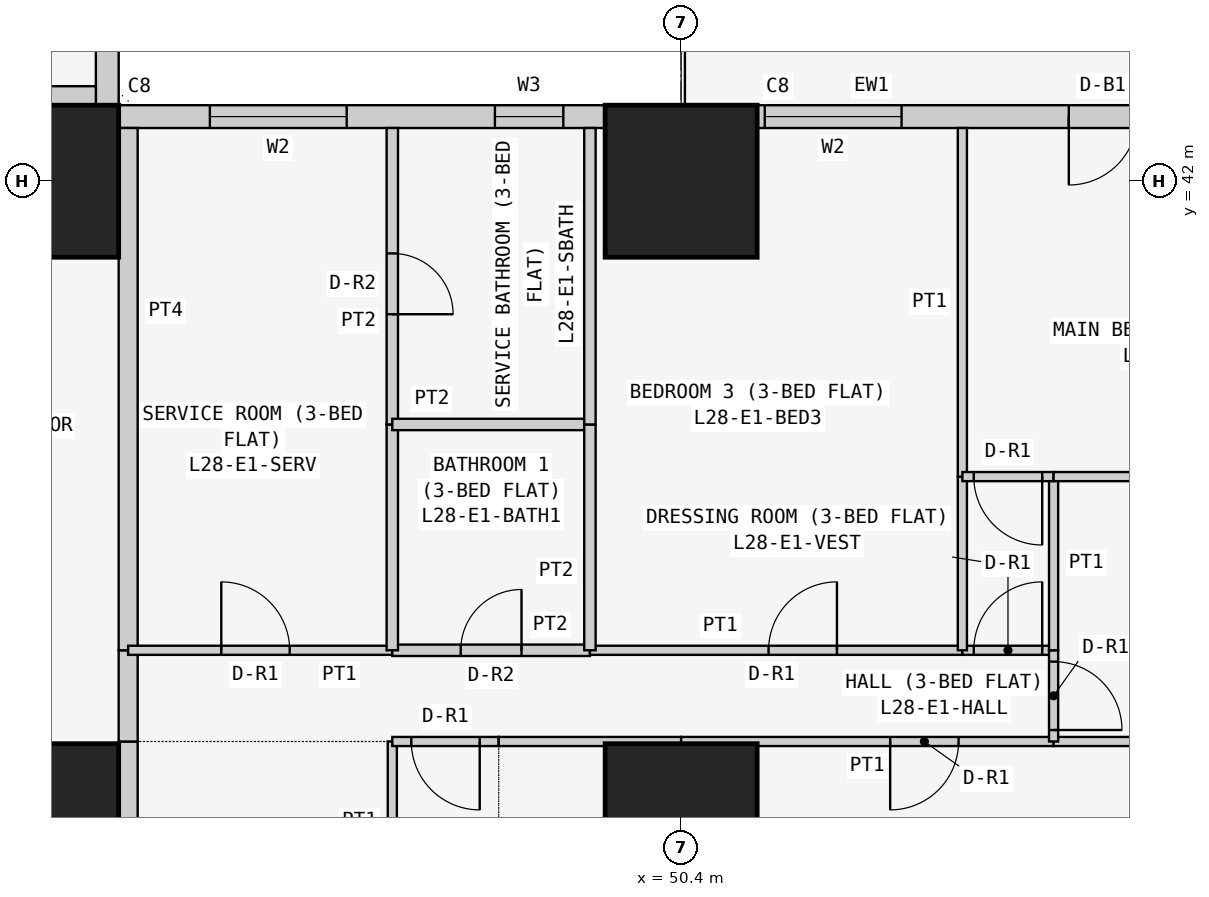
"""IFC4 building model, lengths in metres.
Left out: names, types, materials, properties, quantities, classifications, styles, units other than length and angle.
Written with IfcOpenShell. Run it as: python <this file> out.ifc"""

import sys

from ifc_helpers import new_model, si_unit, direction, frame, frame_2d, origin, origin_2d, place, context, subcontext, project, spatial, rectangle, extrude, element, fill, save


model = new_model("IFC4")
c1 = context("Model", 3, precision=1e-05, world=origin(), true_north=direction((0.0, 1.0)))
c2 = subcontext(c1, "Body", "Model", "MODEL_VIEW")
j1 = project(units=[si_unit("LENGTHUNIT", "METRE"), si_unit("PLANEANGLEUNIT", "RADIAN")], contexts=[c1])
p1 = place(None, origin())
s1 = spatial("IfcSite", under=j1, at=p1, CompositionType="ELEMENT")
p2 = place(p1, origin())
s2 = spatial("IfcBuilding", under=s1, at=p2, CompositionType="ELEMENT")
p3 = place(p2, frame((0.0, 0.0, 112.5)))
s3 = spatial("IfcBuildingStorey", under=s2, at=p3, CompositionType="ELEMENT", Elevation=112.5)
for number, where, z_axis, x_axis in (
    (1, (42.0, 33.6, 0.0), (0.0, 0.0, 1.0), (1.0, 0.0, 0.0)),
    (2, (42.0, 42.0, 0.0), (0.0, 0.0, 1.0), (1.0, 0.0, 0.0)),
    (3, (50.4, 33.6, 0.0), (0.0, 0.0, 1.0), (1.0, 0.0, 0.0)),
    (4, (50.4, 42.0, 0.0), (0.0, 0.0, 1.0), (1.0, 0.0, 0.0)),
):
    element("IfcColumn", number, at=place(p3, frame(where, z_axis=z_axis, x_axis=x_axis)), inside=s3, PredefinedType="COLUMN", context=c2, shape_type="SweptSolid", body=[
        extrude(rectangle(XDim=2.0, YDim=2.0, at=origin_2d()), origin(), (0.0, 0.0, 1.0), 3.6),
    ])
p4 = place(p3, frame((58.4, 42.85, 0.0), z_axis=(0.0, 0.0, 1.0), x_axis=(-1.0, 0.0, 0.0)))
e5 = element("IfcWall", 5, at=p4, inside=s3, PredefinedType="SOLIDWALL", context=c2, shape_type="SweptSolid", body=[
    extrude(rectangle(XDim=15.7, YDim=0.3, at=frame_2d((7.85, 0.0))), origin(), (0.0, 0.0, 1.0), 3.45),
])
p5 = place(p4, frame((12.4, 0.0, 0.9)))
e6 = element("IfcOpeningElement", 6, at=p5, cuts=e5, PredefinedType="OPENING", context=c2, shape_type="SweptSolid", body=[
    extrude(rectangle(XDim=1.8, YDim=1.5, at=frame_2d((0.9, 0.75))), frame((0.0, 0.16, 0.0), z_axis=(0.0, -1.0, 0.0), x_axis=(1.0, 0.0, 0.0)), (0.0, 0.0, 1.0), 0.32),
])
p6 = place(p4, frame((9.55, 0.0, 1.5)))
e7 = element("IfcOpeningElement", 7, at=p6, cuts=e5, PredefinedType="OPENING", context=c2, shape_type="SweptSolid", body=[
    extrude(rectangle(XDim=0.9, YDim=0.7, at=frame_2d((0.45, 0.35))), frame((0.0, 0.16, 0.0), z_axis=(0.0, -1.0, 0.0), x_axis=(1.0, 0.0, 0.0)), (0.0, 0.0, 1.0), 0.32),
])
p7 = place(p4, frame((5.1, 0.0, 0.9)))
e8 = element("IfcOpeningElement", 8, at=p7, cuts=e5, PredefinedType="OPENING", context=c2, shape_type="SweptSolid", body=[
    extrude(rectangle(XDim=1.8, YDim=1.5, at=frame_2d((0.9, 0.75))), frame((0.0, 0.16, 0.0), z_axis=(0.0, -1.0, 0.0), x_axis=(1.0, 0.0, 0.0)), (0.0, 0.0, 1.0), 0.32),
])
p8 = place(p4, frame((2.0, 0.0, 0.0)))
e9 = element("IfcOpeningElement", 9, at=p8, cuts=e5, PredefinedType="OPENING", context=c2, shape_type="SweptSolid", body=[
    extrude(rectangle(XDim=0.9, YDim=2.4, at=frame_2d((0.45, 1.2))), frame((0.0, 0.16, 0.0), z_axis=(0.0, -1.0, 0.0), x_axis=(1.0, 0.0, 0.0)), (0.0, 0.0, 1.0), 0.32),
])
p9 = place(p4, frame((0.7, 0.0, 0.9)))
e10 = element("IfcOpeningElement", 10, at=p9, cuts=e5, PredefinedType="OPENING", context=c2, shape_type="SweptSolid", body=[
    extrude(rectangle(XDim=1.2, YDim=1.5, at=frame_2d((0.6, 0.75))), frame((0.0, 0.16, 0.0), z_axis=(0.0, -1.0, 0.0), x_axis=(1.0, 0.0, 0.0)), (0.0, 0.0, 1.0), 0.32),
])
p10 = place(p3, frame((42.85, 43.0, 0.0), z_axis=(0.0, 0.0, 1.0), x_axis=(0.0, 1.0, 0.0)))
e11 = element("IfcWall", 11, at=p10, inside=s3, PredefinedType="SOLIDWALL", context=c2, shape_type="SweptSolid", body=[
    extrude(rectangle(XDim=7.0, YDim=0.3, at=frame_2d((3.5, 0.0))), origin(), (0.0, 0.0, 1.0), 3.45),
])
p11 = place(p10, frame((1.5, 0.0, 0.9)))
e12 = element("IfcOpeningElement", 12, at=p11, cuts=e11, PredefinedType="OPENING", context=c2, shape_type="SweptSolid", body=[
    extrude(rectangle(XDim=2.4, YDim=1.5, at=frame_2d((1.2, 0.75))), frame((0.0, 0.16, 0.0), z_axis=(0.0, -1.0, 0.0), x_axis=(1.0, 0.0, 0.0)), (0.0, 0.0, 1.0), 0.32),
])
p12 = place(p10, frame((5.05, 0.0, 0.9)))
e13 = element("IfcOpeningElement", 13, at=p12, cuts=e11, PredefinedType="OPENING", context=c2, shape_type="SweptSolid", body=[
    extrude(rectangle(XDim=1.2, YDim=1.5, at=frame_2d((0.6, 0.75))), frame((0.0, 0.16, 0.0), z_axis=(0.0, -1.0, 0.0), x_axis=(1.0, 0.0, 0.0)), (0.0, 0.0, 1.0), 0.32),
])
p13 = place(p3, frame((35.829, 43.125, 0.0), z_axis=(0.0, 0.0, 1.0), x_axis=(1.0, 0.0, 0.0)))
e14 = element("IfcWall", 14, at=p13, inside=s3, PredefinedType="PARTITIONING", context=c2, shape_type="SweptSolid", body=[
    extrude(rectangle(XDim=6.871, YDim=0.25, at=frame_2d((3.436, 0.0))), origin(), (0.0, 0.0, 1.0), 3.45),
])
p14 = place(p3, frame((43.125, 34.629, 0.0), z_axis=(0.0, 0.0, 1.0), x_axis=(0.0, -1.0, 0.0)))
e15 = element("IfcWall", 15, at=p14, inside=s3, PredefinedType="PARTITIONING", context=c2, shape_type="SweptSolid", body=[
    extrude(rectangle(XDim=5.229, YDim=0.25, at=frame_2d((2.615, 0.0))), origin(), (0.0, 0.0, 1.0), 3.45),
])
p15 = place(p14, frame((2.229, 0.0, 0.0)))
e16 = element("IfcOpeningElement", 16, at=p15, cuts=e15, PredefinedType="OPENING", context=c2, shape_type="SweptSolid", body=[
    extrude(rectangle(XDim=1.0, YDim=2.1, at=frame_2d((0.5, 1.05))), frame((0.0, 0.135, 0.0), z_axis=(0.0, -1.0, 0.0), x_axis=(1.0, 0.0, 0.0)), (0.0, 0.0, 1.0), 0.27),
])
p16 = place(p3, frame((43.125, 35.829, 0.0), z_axis=(0.0, 0.0, 1.0), x_axis=(0.0, -1.0, 0.0)))
e17 = element("IfcWall", 17, at=p16, inside=s3, PredefinedType="PARTITIONING", context=c2, shape_type="SweptSolid", body=[
    extrude(rectangle(XDim=1.2, YDim=0.25, at=frame_2d((0.6, 0.0))), origin(), (0.0, 0.0, 1.0), 3.45),
])
p17 = place(p3, frame((43.125, 42.7, 0.0), z_axis=(0.0, 0.0, 1.0), x_axis=(0.0, -1.0, 0.0)))
e18 = element("IfcWall", 18, at=p17, inside=s3, PredefinedType="PARTITIONING", context=c2, shape_type="SweptSolid", body=[
    extrude(rectangle(XDim=6.871, YDim=0.25, at=frame_2d((3.436, 0.0))), origin(), (0.0, 0.0, 1.0), 3.45),
])
p18 = place(p3, frame((46.6, 29.4, 0.0), z_axis=(0.0, 0.0, 1.0), x_axis=(0.0, 1.0, 0.0)))
e19 = element("IfcWall", 19, at=p18, inside=s3, PredefinedType="PARTITIONING", context=c2, shape_type="SweptSolid", body=[
    extrude(rectangle(XDim=5.229, YDim=0.12, at=frame_2d((2.615, 0.0))), origin(), (0.0, 0.0, 1.0), 3.45),
])
p19 = place(p3, frame((48.0, 34.629, 0.0), z_axis=(0.0, 0.0, 1.0), x_axis=(-1.0, 0.0, 0.0)))
e20 = element("IfcWall", 20, at=p19, inside=s3, PredefinedType="PARTITIONING", context=c2, shape_type="SweptSolid", body=[
    extrude(rectangle(XDim=1.4, YDim=0.12, at=frame_2d((0.7, 0.0))), origin(), (0.0, 0.0, 1.0), 3.45),
])
p20 = place(p19, frame((0.25, 0.0, 0.0)))
e21 = element("IfcOpeningElement", 21, at=p20, cuts=e20, PredefinedType="OPENING", context=c2, shape_type="SweptSolid", body=[
    extrude(rectangle(XDim=0.9, YDim=2.1, at=frame_2d((0.45, 1.05))), frame((0.0, 0.07, 0.0), z_axis=(0.0, -1.0, 0.0), x_axis=(1.0, 0.0, 0.0)), (0.0, 0.0, 1.0), 0.14),
])
p21 = place(p3, frame((50.4, 34.629, 0.0), z_axis=(0.0, 0.0, 1.0), x_axis=(-1.0, 0.0, 0.0)))
e22 = element("IfcWall", 22, at=p21, inside=s3, PredefinedType="PARTITIONING", context=c2, shape_type="SweptSolid", body=[
    extrude(rectangle(XDim=2.4, YDim=0.12, at=frame_2d((1.2, 0.0))), origin(), (0.0, 0.0, 1.0), 3.45),
])
p22 = place(p3, frame((55.3, 34.629, 0.0), z_axis=(0.0, 0.0, 1.0), x_axis=(-1.0, 0.0, 0.0)))
e23 = element("IfcWall", 23, at=p22, inside=s3, PredefinedType="PARTITIONING", context=c2, shape_type="SweptSolid", body=[
    extrude(rectangle(XDim=4.9, YDim=0.12, at=frame_2d((2.45, 0.0))), origin(), (0.0, 0.0, 1.0), 3.45),
])
p23 = place(p22, frame((1.25, 0.0, 0.0)))
e24 = element("IfcOpeningElement", 24, at=p23, cuts=e23, PredefinedType="OPENING", context=c2, shape_type="SweptSolid", body=[
    extrude(rectangle(XDim=0.9, YDim=2.1, at=frame_2d((0.45, 1.05))), frame((0.0, 0.07, 0.0), z_axis=(0.0, -1.0, 0.0), x_axis=(1.0, 0.0, 0.0)), (0.0, 0.0, 1.0), 0.14),
])
p24 = place(p3, frame((59.45, 34.629, 0.0), z_axis=(0.0, 0.0, 1.0), x_axis=(-1.0, 0.0, 0.0)))
e25 = element("IfcWall", 25, at=p24, inside=s3, PredefinedType="PARTITIONING", context=c2, shape_type="SweptSolid", body=[
    extrude(rectangle(XDim=4.15, YDim=0.12, at=frame_2d((2.075, 0.0))), origin(), (0.0, 0.0, 1.0), 3.45),
])
p25 = place(p3, frame((46.6, 35.829, 0.0), z_axis=(0.0, 0.0, 1.0), x_axis=(-1.0, 0.0, 0.0)))
e26 = element("IfcWall", 26, at=p25, inside=s3, PredefinedType="PARTITIONING", context=c2, shape_type="SweptSolid", body=[
    extrude(rectangle(XDim=3.475, YDim=0.12, at=frame_2d((1.738, 0.0))), origin(), (0.0, 0.0, 1.0), 3.45),
])
p26 = place(p25, frame((1.35, 0.0, 0.0)))
e27 = element("IfcOpeningElement", 27, at=p26, cuts=e26, PredefinedType="OPENING", context=c2, shape_type="SweptSolid", body=[
    extrude(rectangle(XDim=0.9, YDim=2.1, at=frame_2d((0.45, 1.05))), frame((0.0, 0.07, 0.0), z_axis=(0.0, -1.0, 0.0), x_axis=(1.0, 0.0, 0.0)), (0.0, 0.0, 1.0), 0.14),
])
p27 = place(p3, frame((49.2, 35.829, 0.0), z_axis=(0.0, 0.0, 1.0), x_axis=(-1.0, 0.0, 0.0)))
e28 = element("IfcWall", 28, at=p27, inside=s3, PredefinedType="PARTITIONING", context=c2, shape_type="SweptSolid", body=[
    extrude(rectangle(XDim=2.6, YDim=0.15, at=frame_2d((1.3, 0.0))), origin(), (0.0, 0.0, 1.0), 3.45),
])
p28 = place(p27, frame((0.9, 0.0, 0.0)))
e29 = element("IfcOpeningElement", 29, at=p28, cuts=e28, PredefinedType="OPENING", context=c2, shape_type="SweptSolid", body=[
    extrude(rectangle(XDim=0.8, YDim=2.1, at=frame_2d((0.4, 1.05))), frame((0.0, 0.085, 0.0), z_axis=(0.0, -1.0, 0.0), x_axis=(1.0, 0.0, 0.0)), (0.0, 0.0, 1.0), 0.17),
])
p29 = place(p3, frame((54.1, 35.829, 0.0), z_axis=(0.0, 0.0, 1.0), x_axis=(-1.0, 0.0, 0.0)))
e30 = element("IfcWall", 30, at=p29, inside=s3, PredefinedType="PARTITIONING", context=c2, shape_type="SweptSolid", body=[
    extrude(rectangle(XDim=4.9, YDim=0.12, at=frame_2d((2.45, 0.0))), origin(), (0.0, 0.0, 1.0), 3.45),
])
p30 = place(p29, frame((1.65, 0.0, 0.0)))
e31 = element("IfcOpeningElement", 31, at=p30, cuts=e30, PredefinedType="OPENING", context=c2, shape_type="SweptSolid", body=[
    extrude(rectangle(XDim=0.9, YDim=2.1, at=frame_2d((0.45, 1.05))), frame((0.0, 0.07, 0.0), z_axis=(0.0, -1.0, 0.0), x_axis=(1.0, 0.0, 0.0)), (0.0, 0.0, 1.0), 0.14),
])
p31 = place(p3, frame((55.3, 35.829, 0.0), z_axis=(0.0, 0.0, 1.0), x_axis=(-1.0, 0.0, 0.0)))
e32 = element("IfcWall", 32, at=p31, inside=s3, PredefinedType="PARTITIONING", context=c2, shape_type="SweptSolid", body=[
    extrude(rectangle(XDim=1.2, YDim=0.12, at=frame_2d((0.6, 0.0))), origin(), (0.0, 0.0, 1.0), 3.45),
])
p32 = place(p31, frame((0.15, 0.0, 0.0)))
e33 = element("IfcOpeningElement", 33, at=p32, cuts=e32, PredefinedType="OPENING", context=c2, shape_type="SweptSolid", body=[
    extrude(rectangle(XDim=0.9, YDim=2.1, at=frame_2d((0.45, 1.05))), frame((0.0, 0.07, 0.0), z_axis=(0.0, -1.0, 0.0), x_axis=(1.0, 0.0, 0.0)), (0.0, 0.0, 1.0), 0.14),
])
p33 = place(p3, frame((55.3, 34.629, 0.0), z_axis=(0.0, 0.0, 1.0), x_axis=(0.0, 1.0, 0.0)))
e34 = element("IfcWall", 34, at=p33, inside=s3, PredefinedType="PARTITIONING", context=c2, shape_type="SweptSolid", body=[
    extrude(rectangle(XDim=1.2, YDim=0.12, at=frame_2d((0.6, 0.0))), origin(), (0.0, 0.0, 1.0), 3.45),
])
p34 = place(p33, frame((0.151, 0.0, 0.0)))
e35 = element("IfcOpeningElement", 35, at=p34, cuts=e34, PredefinedType="OPENING", context=c2, shape_type="SweptSolid", body=[
    extrude(rectangle(XDim=0.9, YDim=2.1, at=frame_2d((0.45, 1.05))), frame((0.0, 0.07, 0.0), z_axis=(0.0, -1.0, 0.0), x_axis=(1.0, 0.0, 0.0)), (0.0, 0.0, 1.0), 0.14),
])
p35 = place(p3, frame((46.6, 35.829, 0.0), z_axis=(0.0, 0.0, 1.0), x_axis=(0.0, 1.0, 0.0)))
e36 = element("IfcWall", 36, at=p35, inside=s3, PredefinedType="PARTITIONING", context=c2, shape_type="SweptSolid", body=[
    extrude(rectangle(XDim=2.971, YDim=0.15, at=frame_2d((1.485, 0.0))), origin(), (0.0, 0.0, 1.0), 3.45),
])
p36 = place(p3, frame((46.6, 38.8, 0.0), z_axis=(0.0, 0.0, 1.0), x_axis=(0.0, 1.0, 0.0)))
e37 = element("IfcWall", 37, at=p36, inside=s3, PredefinedType="PARTITIONING", context=c2, shape_type="SweptSolid", body=[
    extrude(rectangle(XDim=3.9, YDim=0.15, at=frame_2d((1.95, 0.0))), origin(), (0.0, 0.0, 1.0), 3.45),
])
p37 = place(p36, frame((1.45, 0.0, 0.0)))
e38 = element("IfcOpeningElement", 38, at=p37, cuts=e37, PredefinedType="OPENING", context=c2, shape_type="SweptSolid", body=[
    extrude(rectangle(XDim=0.8, YDim=2.1, at=frame_2d((0.4, 1.05))), frame((0.0, 0.085, 0.0), z_axis=(0.0, -1.0, 0.0), x_axis=(1.0, 0.0, 0.0)), (0.0, 0.0, 1.0), 0.17),
])
p38 = place(p3, frame((49.2, 38.8, 0.0), z_axis=(0.0, 0.0, 1.0), x_axis=(-1.0, 0.0, 0.0)))
e39 = element("IfcWall", 39, at=p38, inside=s3, PredefinedType="PARTITIONING", context=c2, shape_type="SweptSolid", body=[
    extrude(rectangle(XDim=2.6, YDim=0.15, at=frame_2d((1.3, 0.0))), origin(), (0.0, 0.0, 1.0), 3.45),
])
p39 = place(p3, frame((49.2, 35.829, 0.0), z_axis=(0.0, 0.0, 1.0), x_axis=(0.0, 1.0, 0.0)))
e40 = element("IfcWall", 40, at=p39, inside=s3, PredefinedType="PARTITIONING", context=c2, shape_type="SweptSolid", body=[
    extrude(rectangle(XDim=2.971, YDim=0.15, at=frame_2d((1.485, 0.0))), origin(), (0.0, 0.0, 1.0), 3.45),
])
p40 = place(p3, frame((49.2, 38.8, 0.0), z_axis=(0.0, 0.0, 1.0), x_axis=(0.0, 1.0, 0.0)))
e41 = element("IfcWall", 41, at=p40, inside=s3, PredefinedType="PARTITIONING", context=c2, shape_type="SweptSolid", body=[
    extrude(rectangle(XDim=3.9, YDim=0.15, at=frame_2d((1.95, 0.0))), origin(), (0.0, 0.0, 1.0), 3.45),
])
p41 = place(p3, frame((54.1, 35.829, 0.0), z_axis=(0.0, 0.0, 1.0), x_axis=(0.0, 1.0, 0.0)))
e42 = element("IfcWall", 42, at=p41, inside=s3, PredefinedType="PARTITIONING", context=c2, shape_type="SweptSolid", body=[
    extrude(rectangle(XDim=2.285, YDim=0.12, at=frame_2d((1.143, 0.0))), origin(), (0.0, 0.0, 1.0), 3.45),
])
p42 = place(p3, frame((54.1, 38.114, 0.0), z_axis=(0.0, 0.0, 1.0), x_axis=(0.0, 1.0, 0.0)))
e43 = element("IfcWall", 43, at=p42, inside=s3, PredefinedType="PARTITIONING", context=c2, shape_type="SweptSolid", body=[
    extrude(rectangle(XDim=4.586, YDim=0.12, at=frame_2d((2.293, 0.0))), origin(), (0.0, 0.0, 1.0), 3.45),
])
p43 = place(p3, frame((55.3, 35.829, 0.0), z_axis=(0.0, 0.0, 1.0), x_axis=(0.0, 1.0, 0.0)))
e44 = element("IfcWall", 44, at=p43, inside=s3, PredefinedType="PARTITIONING", context=c2, shape_type="SweptSolid", body=[
    extrude(rectangle(XDim=2.285, YDim=0.12, at=frame_2d((1.143, 0.0))), origin(), (0.0, 0.0, 1.0), 3.45),
])
p44 = place(p3, frame((55.3, 38.114, 0.0), z_axis=(0.0, 0.0, 1.0), x_axis=(-1.0, 0.0, 0.0)))
e45 = element("IfcWall", 45, at=p44, inside=s3, PredefinedType="PARTITIONING", context=c2, shape_type="SweptSolid", body=[
    extrude(rectangle(XDim=1.2, YDim=0.12, at=frame_2d((0.6, 0.0))), origin(), (0.0, 0.0, 1.0), 3.45),
])
p45 = place(p44, frame((0.15, 0.0, 0.0)))
e46 = element("IfcOpeningElement", 46, at=p45, cuts=e45, PredefinedType="OPENING", context=c2, shape_type="SweptSolid", body=[
    extrude(rectangle(XDim=0.9, YDim=2.1, at=frame_2d((0.45, 1.05))), frame((0.0, 0.07, 0.0), z_axis=(0.0, -1.0, 0.0), x_axis=(1.0, 0.0, 0.0)), (0.0, 0.0, 1.0), 0.14),
])
p46 = place(p3, frame((59.45, 38.114, 0.0), z_axis=(0.0, 0.0, 1.0), x_axis=(-1.0, 0.0, 0.0)))
e47 = element("IfcWall", 47, at=p46, inside=s3, PredefinedType="PARTITIONING", context=c2, shape_type="SweptSolid", body=[
    extrude(rectangle(XDim=4.15, YDim=0.12, at=frame_2d((2.075, 0.0))), origin(), (0.0, 0.0, 1.0), 3.45),
])
p47 = place(p5, origin())
e48 = element("IfcWindow", 48, at=p47, inside=s3, PartitioningType="SINGLE_PANEL", PredefinedType="WINDOW", context=c2, shape_type="SweptSolid", body=[
    extrude(rectangle(XDim=1.8, YDim=1.5, at=frame_2d((0.9, 0.75))), frame((0.0, 0.03, 0.0), z_axis=(0.0, -1.0, 0.0), x_axis=(1.0, 0.0, 0.0)), (0.0, 0.0, 1.0), 0.06),
])
fill(e6, e48)
p48 = place(p6, origin())
e49 = element("IfcWindow", 49, at=p48, inside=s3, PartitioningType="SINGLE_PANEL", PredefinedType="WINDOW", context=c2, shape_type="SweptSolid", body=[
    extrude(rectangle(XDim=0.9, YDim=0.7, at=frame_2d((0.45, 0.35))), frame((0.0, 0.03, 0.0), z_axis=(0.0, -1.0, 0.0), x_axis=(1.0, 0.0, 0.0)), (0.0, 0.0, 1.0), 0.06),
])
fill(e7, e49)
p49 = place(p7, origin())
e50 = element("IfcWindow", 50, at=p49, inside=s3, PartitioningType="SINGLE_PANEL", PredefinedType="WINDOW", context=c2, shape_type="SweptSolid", body=[
    extrude(rectangle(XDim=1.8, YDim=1.5, at=frame_2d((0.9, 0.75))), frame((0.0, 0.03, 0.0), z_axis=(0.0, -1.0, 0.0), x_axis=(1.0, 0.0, 0.0)), (0.0, 0.0, 1.0), 0.06),
])
fill(e8, e50)
p50 = place(p8, origin())
e51 = element("IfcDoor", 51, at=p50, inside=s3, OperationType="SINGLE_SWING_RIGHT", PredefinedType="DOOR", context=c2, shape_type="SweptSolid", body=[
    extrude(rectangle(XDim=0.9, YDim=2.4, at=frame_2d((0.45, 1.2))), frame((0.0, 0.025, 0.0), z_axis=(0.0, -1.0, 0.0), x_axis=(1.0, 0.0, 0.0)), (0.0, 0.0, 1.0), 0.05),
])
fill(e9, e51)
p51 = place(p20, origin())
e52 = element("IfcDoor", 52, at=p51, inside=s3, OperationType="SINGLE_SWING_LEFT", PredefinedType="DOOR", context=c2, shape_type="SweptSolid", body=[
    extrude(rectangle(XDim=0.9, YDim=2.1, at=frame_2d((0.45, 1.05))), frame((0.0, 0.025, 0.0), z_axis=(0.0, -1.0, 0.0), x_axis=(1.0, 0.0, 0.0)), (0.0, 0.0, 1.0), 0.05),
])
fill(e21, e52)
p52 = place(p23, origin())
e53 = element("IfcDoor", 53, at=p52, inside=s3, OperationType="SINGLE_SWING_RIGHT", PredefinedType="DOOR", context=c2, shape_type="SweptSolid", body=[
    extrude(rectangle(XDim=0.9, YDim=2.1, at=frame_2d((0.45, 1.05))), frame((0.0, 0.025, 0.0), z_axis=(0.0, -1.0, 0.0), x_axis=(1.0, 0.0, 0.0)), (0.0, 0.0, 1.0), 0.05),
])
fill(e24, e53)
p53 = place(p26, frame((0.9, 0.0, 0.0), z_axis=(0.0, 0.0, 1.0), x_axis=(-1.0, 0.0, 0.0)))
e54 = element("IfcDoor", 54, at=p53, inside=s3, OperationType="SINGLE_SWING_LEFT", PredefinedType="DOOR", context=c2, shape_type="SweptSolid", body=[
    extrude(rectangle(XDim=0.9, YDim=2.1, at=frame_2d((0.45, 1.05))), frame((0.0, 0.025, 0.0), z_axis=(0.0, -1.0, 0.0), x_axis=(1.0, 0.0, 0.0)), (0.0, 0.0, 1.0), 0.05),
])
fill(e27, e54)
p54 = place(p37, frame((0.8, 0.0, 0.0), z_axis=(0.0, 0.0, 1.0), x_axis=(-1.0, 0.0, 0.0)))
e55 = element("IfcDoor", 55, at=p54, inside=s3, OperationType="SINGLE_SWING_RIGHT", PredefinedType="DOOR", context=c2, shape_type="SweptSolid", body=[
    extrude(rectangle(XDim=0.8, YDim=2.1, at=frame_2d((0.4, 1.05))), frame((0.0, 0.025, 0.0), z_axis=(0.0, -1.0, 0.0), x_axis=(1.0, 0.0, 0.0)), (0.0, 0.0, 1.0), 0.05),
])
fill(e38, e55)
p55 = place(p28, frame((0.8, 0.0, 0.0), z_axis=(0.0, 0.0, 1.0), x_axis=(-1.0, 0.0, 0.0)))
e56 = element("IfcDoor", 56, at=p55, inside=s3, OperationType="SINGLE_SWING_RIGHT", PredefinedType="DOOR", context=c2, shape_type="SweptSolid", body=[
    extrude(rectangle(XDim=0.8, YDim=2.1, at=frame_2d((0.4, 1.05))), frame((0.0, 0.025, 0.0), z_axis=(0.0, -1.0, 0.0), x_axis=(1.0, 0.0, 0.0)), (0.0, 0.0, 1.0), 0.05),
])
fill(e29, e56)
p56 = place(p30, frame((0.9, 0.0, 0.0), z_axis=(0.0, 0.0, 1.0), x_axis=(-1.0, 0.0, 0.0)))
e57 = element("IfcDoor", 57, at=p56, inside=s3, OperationType="SINGLE_SWING_RIGHT", PredefinedType="DOOR", context=c2, shape_type="SweptSolid", body=[
    extrude(rectangle(XDim=0.9, YDim=2.1, at=frame_2d((0.45, 1.05))), frame((0.0, 0.025, 0.0), z_axis=(0.0, -1.0, 0.0), x_axis=(1.0, 0.0, 0.0)), (0.0, 0.0, 1.0), 0.05),
])
fill(e31, e57)
p57 = place(p32, frame((0.9, 0.0, 0.0), z_axis=(0.0, 0.0, 1.0), x_axis=(-1.0, 0.0, 0.0)))
e58 = element("IfcDoor", 58, at=p57, inside=s3, OperationType="SINGLE_SWING_RIGHT", PredefinedType="DOOR", context=c2, shape_type="SweptSolid", body=[
    extrude(rectangle(XDim=0.9, YDim=2.1, at=frame_2d((0.45, 1.05))), frame((0.0, 0.025, 0.0), z_axis=(0.0, -1.0, 0.0), x_axis=(1.0, 0.0, 0.0)), (0.0, 0.0, 1.0), 0.05),
])
fill(e33, e58)
p58 = place(p45, origin())
e59 = element("IfcDoor", 59, at=p58, inside=s3, OperationType="SINGLE_SWING_LEFT", PredefinedType="DOOR", context=c2, shape_type="SweptSolid", body=[
    extrude(rectangle(XDim=0.9, YDim=2.1, at=frame_2d((0.45, 1.05))), frame((0.0, 0.025, 0.0), z_axis=(0.0, -1.0, 0.0), x_axis=(1.0, 0.0, 0.0)), (0.0, 0.0, 1.0), 0.05),
])
fill(e46, e59)
p59 = place(p34, frame((0.9, 0.0, 0.0), z_axis=(0.0, 0.0, 1.0), x_axis=(-1.0, 0.0, 0.0)))
e60 = element("IfcDoor", 60, at=p59, inside=s3, OperationType="SINGLE_SWING_RIGHT", PredefinedType="DOOR", context=c2, shape_type="SweptSolid", body=[
    extrude(rectangle(XDim=0.9, YDim=2.1, at=frame_2d((0.45, 1.05))), frame((0.0, 0.025, 0.0), z_axis=(0.0, -1.0, 0.0), x_axis=(1.0, 0.0, 0.0)), (0.0, 0.0, 1.0), 0.05),
])
fill(e35, e60)
save(model, sys.argv[1])
